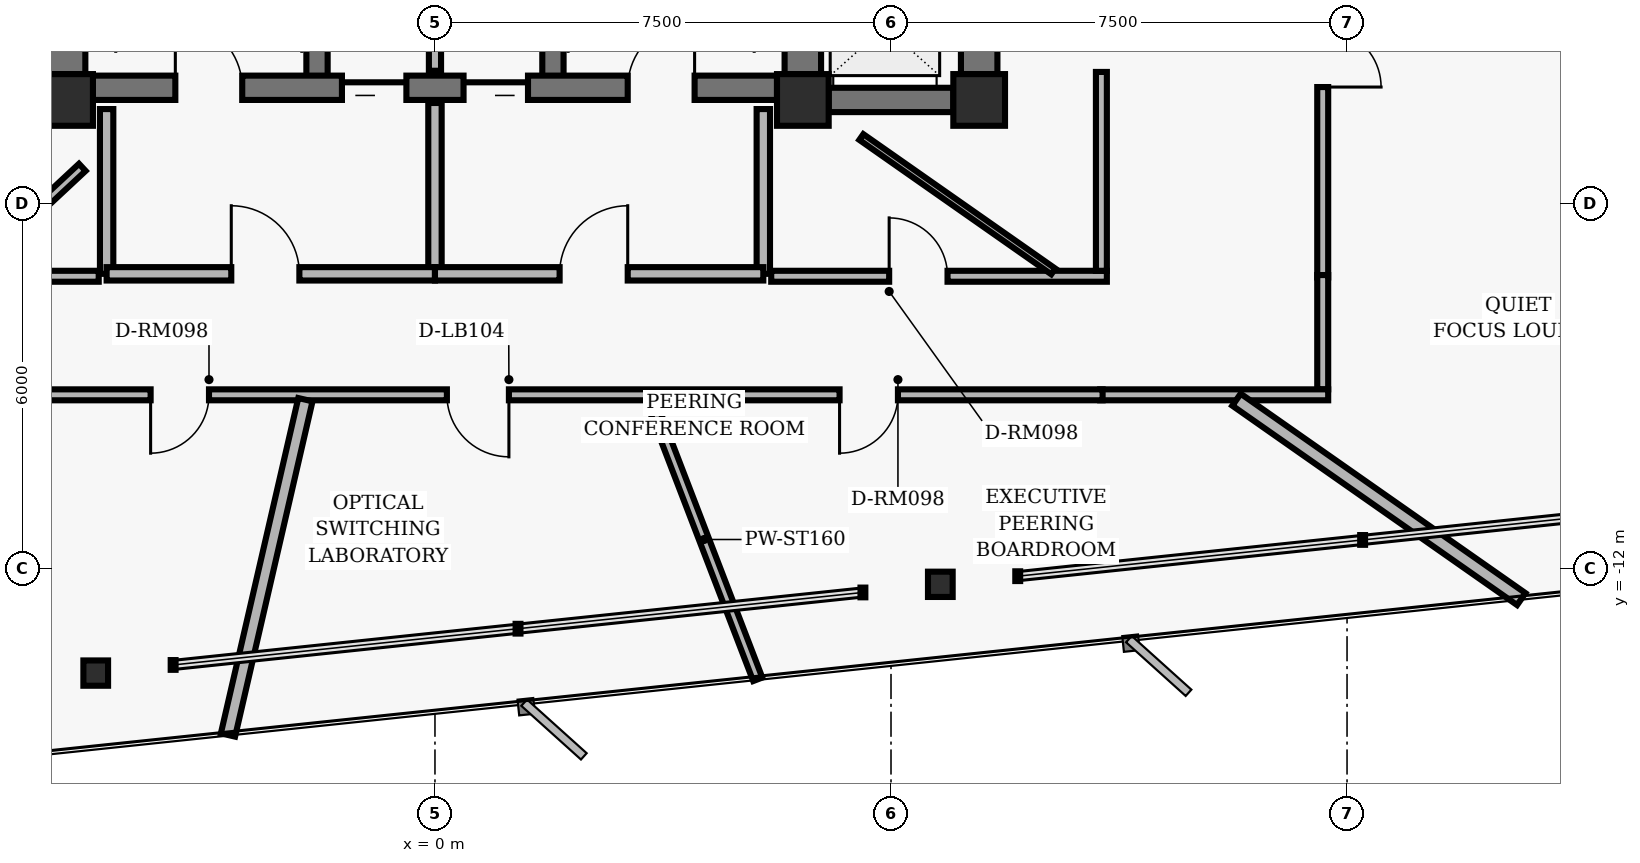
"""IFC4 building model, lengths in metres.
Left out: names, types, materials, properties, quantities, classifications, styles, units other than length and angle.
Written with IfcOpenShell. Run it as: python <this file> out.ifc"""

import sys

from ifc_helpers import new_model, si_unit, direction, frame, frame_2d, origin, origin_2d, place, context, subcontext, project, spatial, rectangle, hollow_rectangle, i_section, extrude, element, fill, save


model = new_model("IFC4")
c1 = context("Model", 3, precision=1e-05, world=origin(), true_north=direction((0.0, 1.0)))
c2 = subcontext(c1, "Body", "Model", "MODEL_VIEW")
j1 = project(units=[si_unit("LENGTHUNIT", "METRE"), si_unit("PLANEANGLEUNIT", "RADIAN")], contexts=[c1])
p1 = place(None, origin())
s1 = spatial("IfcSite", under=j1, at=p1, CompositionType="ELEMENT")
p2 = place(p1, origin())
s2 = spatial("IfcBuilding", under=s1, at=p2, CompositionType="ELEMENT")
p3 = place(p2, frame((0.0, 0.0, 116.8)))
s3 = spatial("IfcBuildingStorey", under=s2, at=p3, CompositionType="ELEMENT", Elevation=116.8)
for number, where, z_axis, x_axis in (
    (1, (-6.05, -4.3, 0.0), (0.0, 0.0, 1.0), (1.0, 0.0, 0.0)),
    (2, (6.05, -4.3, 0.0), (0.0, 0.0, 1.0), (1.0, 0.0, 0.0)),
    (3, (8.95, -4.3, 0.0), (0.0, 0.0, 1.0), (1.0, 0.0, 0.0)),
):
    element("IfcColumn", number, at=place(p3, frame(where, z_axis=z_axis, x_axis=x_axis)), inside=s3, PredefinedType="COLUMN", context=c2, shape_type="SweptSolid", body=[
        extrude(hollow_rectangle(XDim=0.85, YDim=0.85, WallThickness=0.055, InnerFilletRadius=0.02, OuterFilletRadius=0.04, at=origin_2d()), origin(), (0.0, 0.0, 1.0), 3.04),
    ])
for number, where, z_axis, x_axis in (
    (4, (-6.05, -3.875, 0.0), (0.0, 0.0, 1.0), (0.0, 1.0, 0.0)),
    (5, (6.05, -3.875, 0.0), (0.0, 0.0, 1.0), (0.0, 1.0, 0.0)),
):
    element("IfcWall", number, at=place(p3, frame(where, z_axis=z_axis, x_axis=x_axis)), inside=s3, PredefinedType="SHEAR", context=c2, shape_type="SweptSolid", body=[
        extrude(rectangle(XDim=3.45, YDim=0.6, at=frame_2d((1.725, 0.0))), origin(), (0.0, 0.0, 1.0), 2.788),
    ])
for number, where, z_axis, x_axis in (
    (6, (-1.94, -4.1, 0.0), (0.0, 0.0, 1.0), (0.0, 1.0, 0.0)),
    (7, (1.94, -4.1, 0.0), (0.0, 0.0, 1.0), (0.0, 1.0, 0.0)),
):
    element("IfcWall", number, at=place(p3, frame(where, z_axis=z_axis, x_axis=x_axis)), inside=s3, PredefinedType="SHEAR", context=c2, shape_type="SweptSolid", body=[
        extrude(rectangle(XDim=8.2, YDim=0.35, at=frame_2d((4.1, 0.0))), origin(), (0.0, 0.0, 1.0), 2.788),
    ])
p4 = place(p3, frame((-5.625, -4.1, 0.0), z_axis=(0.0, 0.0, 1.0), x_axis=(1.0, 0.0, 0.0)))
e8 = element("IfcWall", 8, at=p4, inside=s3, PredefinedType="SHEAR", context=c2, shape_type="SweptSolid", body=[
    extrude(rectangle(XDim=11.25, YDim=0.4, at=frame_2d((5.625, 0.0))), origin(), (0.0, 0.0, 1.0), 2.788),
])
p5 = place(p4, frame((1.355, 0.0, 0.0)))
e9 = element("IfcOpeningElement", 9, at=p5, cuts=e8, PredefinedType="OPENING", context=c2, shape_type="SweptSolid", body=[
    extrude(rectangle(XDim=1.1, YDim=2.04, at=frame_2d((0.55, 1.02))), frame((0.0, 0.21, 0.0), z_axis=(0.0, -1.0, 0.0), x_axis=(1.0, 0.0, 0.0)), (0.0, 0.0, 1.0), 0.42),
])
p6 = place(p4, frame((8.795, 0.0, 0.0)))
e10 = element("IfcOpeningElement", 10, at=p6, cuts=e8, PredefinedType="OPENING", context=c2, shape_type="SweptSolid", body=[
    extrude(rectangle(XDim=1.1, YDim=2.04, at=frame_2d((0.55, 1.02))), frame((0.0, 0.21, 0.0), z_axis=(0.0, -1.0, 0.0), x_axis=(1.0, 0.0, 0.0)), (0.0, 0.0, 1.0), 0.42),
])
p7 = place(p4, frame((4.095, 0.0, 0.0)))
e11 = element("IfcOpeningElement", 11, at=p7, cuts=e8, PredefinedType="OPENING", context=c2, shape_type="SweptSolid", body=[
    extrude(rectangle(XDim=1.06, YDim=2.04, at=frame_2d((0.53, 1.02))), frame((0.0, 0.21, 0.0), z_axis=(0.0, -1.0, 0.0), x_axis=(1.0, 0.0, 0.0)), (0.0, 0.0, 1.0), 0.42),
])
p8 = place(p4, frame((6.095, 0.0, 0.0)))
e12 = element("IfcOpeningElement", 12, at=p8, cuts=e8, PredefinedType="OPENING", context=c2, shape_type="SweptSolid", body=[
    extrude(rectangle(XDim=1.06, YDim=2.04, at=frame_2d((0.53, 1.02))), frame((0.0, 0.21, 0.0), z_axis=(0.0, -1.0, 0.0), x_axis=(1.0, 0.0, 0.0)), (0.0, 0.0, 1.0), 0.42),
])
p9 = place(p3, frame((8.95, -3.875, 0.0), z_axis=(0.0, 0.0, 1.0), x_axis=(0.0, 1.0, 0.0)))
e13 = element("IfcWall", 13, at=p9, inside=s3, PredefinedType="SHEAR", context=c2, shape_type="SweptSolid", body=[
    extrude(rectangle(XDim=7.95, YDim=0.6, at=frame_2d((3.975, 0.0))), origin(), (0.0, 0.0, 1.0), 2.788),
])
p10 = place(p9, frame((0.55, 0.0, 0.0)))
e14 = element("IfcOpeningElement", 14, at=p10, cuts=e13, PredefinedType="OPENING", context=c2, shape_type="SweptSolid", body=[
    extrude(rectangle(XDim=1.06, YDim=2.04, at=frame_2d((0.53, 1.02))), frame((0.0, 0.31, 0.0), z_axis=(0.0, -1.0, 0.0), x_axis=(1.0, 0.0, 0.0)), (0.0, 0.0, 1.0), 0.62),
])
p11 = place(p9, frame((3.445, 0.0, 0.0)))
e15 = element("IfcOpeningElement", 15, at=p11, cuts=e13, PredefinedType="OPENING", context=c2, shape_type="SweptSolid", body=[
    extrude(rectangle(XDim=1.06, YDim=2.04, at=frame_2d((0.53, 1.02))), frame((0.0, 0.31, 0.0), z_axis=(0.0, -1.0, 0.0), x_axis=(1.0, 0.0, 0.0)), (0.0, 0.0, 1.0), 0.62),
])
p12 = place(p9, frame((6.33, 0.0, 0.0)))
e16 = element("IfcOpeningElement", 16, at=p12, cuts=e13, PredefinedType="OPENING", context=c2, shape_type="SweptSolid", body=[
    extrude(rectangle(XDim=1.06, YDim=2.04, at=frame_2d((0.53, 1.02))), frame((0.0, 0.31, 0.0), z_axis=(0.0, -1.0, 0.0), x_axis=(1.0, 0.0, 0.0)), (0.0, 0.0, 1.0), 0.62),
])
p13 = place(p3, frame((6.475, -4.3, 0.0), z_axis=(0.0, 0.0, 1.0), x_axis=(1.0, 0.0, 0.0)))
e17 = element("IfcWall", 17, at=p13, inside=s3, PredefinedType="SHEAR", context=c2, shape_type="SweptSolid", body=[
    extrude(rectangle(XDim=2.05, YDim=0.4, at=frame_2d((1.025, 0.0))), origin(), (0.0, 0.0, 1.0), 2.788),
])
for number, where, z_axis, x_axis in (
    (18, (-5.579, -13.727, 0.0), (0.0, 0.0, 1.0), (1.0, 0.0, 0.0)),
    (19, (8.311, -12.267, 0.0), (0.0, 0.0, 1.0), (1.0, 0.0, 0.0)),
):
    element("IfcColumn", number, at=place(p3, frame(where, z_axis=z_axis, x_axis=x_axis)), inside=s3, PredefinedType="COLUMN", context=c2, shape_type="SweptSolid", body=[
        extrude(i_section(OverallWidth=0.406, OverallDepth=0.416, WebThickness=0.03, FlangeThickness=0.048, FilletRadius=0.02, at=origin_2d()), origin(), (0.0, 0.0, 1.0), 3.04),
    ])
p14 = place(p3, frame((0.0, -3.82, 0.0), z_axis=(0.0, 0.0, 1.0), x_axis=(0.0, 1.0, 0.0)))
e20 = element("IfcWall", 20, at=p14, inside=s3, PredefinedType="PARTITIONING", context=c2, shape_type="SweptSolid", body=[
    extrude(rectangle(XDim=2.67, YDim=0.2, at=frame_2d((1.335, 0.0))), origin(), (0.0, 0.0, 1.0), 2.763),
])
for number, where, z_axis, x_axis in (
    (21, (-5.4, -7.16, 0.0), (0.0, 0.0, 1.0), (0.0, 1.0, 0.0)),
    (22, (5.4, -7.16, 0.0), (0.0, 0.0, 1.0), (0.0, 1.0, 0.0)),
):
    element("IfcWall", number, at=place(p3, frame(where, z_axis=z_axis, x_axis=x_axis)), inside=s3, PredefinedType="PARTITIONING", context=c2, shape_type="SweptSolid", body=[
        extrude(rectangle(XDim=2.71, YDim=0.22, at=frame_2d((1.355, 0.0))), origin(), (0.0, 0.0, 1.0), 2.763),
    ])
p15 = place(p3, frame((0.0, -7.16, 0.0), z_axis=(0.0, 0.0, 1.0), x_axis=(0.0, 1.0, 0.0)))
e23 = element("IfcWall", 23, at=p15, inside=s3, PredefinedType="PARTITIONING", context=c2, shape_type="SweptSolid", body=[
    extrude(rectangle(XDim=2.81, YDim=0.22, at=frame_2d((1.405, 0.0))), origin(), (0.0, 0.0, 1.0), 2.763),
])
p16 = place(p3, frame((-5.4, -7.16, 0.0), z_axis=(0.0, 0.0, 1.0), x_axis=(1.0, 0.0, 0.0)))
e24 = element("IfcWall", 24, at=p16, inside=s3, PredefinedType="PARTITIONING", context=c2, shape_type="SweptSolid", body=[
    extrude(rectangle(XDim=5.4, YDim=0.22, at=frame_2d((2.7, 0.0))), origin(), (0.0, 0.0, 1.0), 2.33),
])
p17 = place(p16, frame((2.05, 0.0, 0.0)))
e25 = element("IfcOpeningElement", 25, at=p17, cuts=e24, PredefinedType="OPENING", context=c2, shape_type="SweptSolid", body=[
    extrude(rectangle(XDim=1.12, YDim=2.02, at=frame_2d((0.56, 1.01))), frame((0.0, 0.12, 0.0), z_axis=(0.0, -1.0, 0.0), x_axis=(1.0, 0.0, 0.0)), (0.0, 0.0, 1.0), 0.24),
])
p18 = place(p3, frame((0.0, -7.16, 0.0), z_axis=(0.0, 0.0, 1.0), x_axis=(1.0, 0.0, 0.0)))
e26 = element("IfcWall", 26, at=p18, inside=s3, PredefinedType="PARTITIONING", context=c2, shape_type="SweptSolid", body=[
    extrude(rectangle(XDim=5.4, YDim=0.22, at=frame_2d((2.7, 0.0))), origin(), (0.0, 0.0, 1.0), 2.33),
])
p19 = place(p18, frame((2.05, 0.0, 0.0)))
e27 = element("IfcOpeningElement", 27, at=p19, cuts=e26, PredefinedType="OPENING", context=c2, shape_type="SweptSolid", body=[
    extrude(rectangle(XDim=1.12, YDim=2.02, at=frame_2d((0.56, 1.01))), frame((0.0, 0.12, 0.0), z_axis=(0.0, -1.0, 0.0), x_axis=(1.0, 0.0, 0.0)), (0.0, 0.0, 1.0), 0.24),
])
p20 = place(p3, frame((14.6, 3.018, 0.0), z_axis=(0.0, 0.0, 1.0), x_axis=(0.0, -1.0, 0.0)))
e28 = element("IfcWall", 28, at=p20, inside=s3, PredefinedType="PARTITIONING", context=c2, shape_type="SweptSolid", body=[
    extrude(rectangle(XDim=10.238, YDim=0.18, at=frame_2d((5.119, 0.0))), origin(), (0.0, 0.0, 1.0), 2.763),
])
p21 = place(p20, frame((6.146, 0.0, 0.0)))
e29 = element("IfcOpeningElement", 29, at=p21, cuts=e28, PredefinedType="OPENING", context=c2, shape_type="SweptSolid", body=[
    extrude(rectangle(XDim=0.96, YDim=2.02, at=frame_2d((0.48, 1.01))), frame((0.0, 0.1, 0.0), z_axis=(0.0, -1.0, 0.0), x_axis=(1.0, 0.0, 0.0)), (0.0, 0.0, 1.0), 0.2),
])
p22 = place(p3, frame((14.6, -7.18, 0.0), z_axis=(0.0, 0.0, 1.0), x_axis=(0.0, -1.0, 0.0)))
e30 = element("IfcWall", 30, at=p22, inside=s3, PredefinedType="PARTITIONING", context=c2, shape_type="SweptSolid", body=[
    extrude(rectangle(XDim=1.88, YDim=0.18, at=frame_2d((0.94, 0.0))), origin(), (0.0, 0.0, 1.0), 2.763),
])
p23 = place(p3, frame((14.69, -9.15, 0.0), z_axis=(0.0, 0.0, 1.0), x_axis=(-1.0, 0.0, 0.0)))
e31 = element("IfcWall", 31, at=p23, inside=s3, PredefinedType="PARTITIONING", context=c2, shape_type="SweptSolid", body=[
    extrude(rectangle(XDim=3.75, YDim=0.18, at=frame_2d((1.875, 0.0))), origin(), (0.0, 0.0, 1.0), 2.33),
])
p24 = place(p3, frame((10.98, -9.15, 0.0), z_axis=(0.0, 0.0, 1.0), x_axis=(-1.0, 0.0, 0.0)))
e32 = element("IfcWall", 32, at=p24, inside=s3, PredefinedType="PARTITIONING", context=c2, shape_type="SweptSolid", body=[
    extrude(rectangle(XDim=17.5, YDim=0.18, at=frame_2d((8.75, 0.0))), origin(), (0.0, 0.0, 1.0), 2.33),
])
p25 = place(p24, frame((14.696, 0.0, 0.0)))
e33 = element("IfcOpeningElement", 33, at=p25, cuts=e32, PredefinedType="OPENING", context=c2, shape_type="SweptSolid", body=[
    extrude(rectangle(XDim=0.96, YDim=2.02, at=frame_2d((0.48, 1.01))), frame((0.0, 0.1, 0.0), z_axis=(0.0, -1.0, 0.0), x_axis=(1.0, 0.0, 0.0)), (0.0, 0.0, 1.0), 0.2),
])
p26 = place(p24, frame((9.764, 0.0, 0.0)))
e34 = element("IfcOpeningElement", 34, at=p26, cuts=e32, PredefinedType="OPENING", context=c2, shape_type="SweptSolid", body=[
    extrude(rectangle(XDim=1.02, YDim=2.02, at=frame_2d((0.51, 1.01))), frame((0.0, 0.1, 0.0), z_axis=(0.0, -1.0, 0.0), x_axis=(1.0, 0.0, 0.0)), (0.0, 0.0, 1.0), 0.2),
])
p27 = place(p24, frame((3.366, 0.0, 0.0)))
e35 = element("IfcOpeningElement", 35, at=p27, cuts=e32, PredefinedType="OPENING", context=c2, shape_type="SweptSolid", body=[
    extrude(rectangle(XDim=0.96, YDim=2.02, at=frame_2d((0.48, 1.01))), frame((0.0, 0.1, 0.0), z_axis=(0.0, -1.0, 0.0), x_axis=(1.0, 0.0, 0.0)), (0.0, 0.0, 1.0), 0.2),
])
p28 = place(p3, frame((5.53, -7.2, 0.0), z_axis=(0.0, 0.0, 1.0), x_axis=(1.0, 0.0, 0.0)))
e36 = element("IfcWall", 36, at=p28, inside=s3, PredefinedType="PARTITIONING", context=c2, shape_type="SweptSolid", body=[
    extrude(rectangle(XDim=5.52, YDim=0.18, at=frame_2d((2.76, 0.0))), origin(), (0.0, 0.0, 1.0), 2.33),
])
p29 = place(p28, frame((1.94, 0.0, 0.0)))
e37 = element("IfcOpeningElement", 37, at=p29, cuts=e36, PredefinedType="OPENING", context=c2, shape_type="SweptSolid", body=[
    extrude(rectangle(XDim=0.96, YDim=2.02, at=frame_2d((0.48, 1.01))), frame((0.0, 0.1, 0.0), z_axis=(0.0, -1.0, 0.0), x_axis=(1.0, 0.0, 0.0)), (0.0, 0.0, 1.0), 0.2),
])
p30 = place(p3, frame((10.96, -7.11, 0.0), z_axis=(0.0, 0.0, 1.0), x_axis=(0.0, 1.0, 0.0)))
e38 = element("IfcWall", 38, at=p30, inside=s3, PredefinedType="PARTITIONING", context=c2, shape_type="SweptSolid", body=[
    extrude(rectangle(XDim=3.271, YDim=0.18, at=frame_2d((1.635, 0.0))), origin(), (0.0, 0.0, 1.0), 2.763),
])
p31 = place(p3, frame((-6.59, -7.2, 0.0), z_axis=(0.0, 0.0, 1.0), x_axis=(1.0, 0.0, 0.0)))
e39 = element("IfcWall", 39, at=p31, inside=s3, PredefinedType="PARTITIONING", context=c2, shape_type="SweptSolid", body=[
    extrude(rectangle(XDim=1.06, YDim=0.18, at=frame_2d((0.53, 0.0))), origin(), (0.0, 0.0, 1.0), 2.33),
])
p32 = place(p3, frame((-5.8, -5.409, 0.0), z_axis=(0.0, 0.0, 1.0), x_axis=(-0.731304251281, -0.682051385204, 0.0)))
e40 = element("IfcWall", 40, at=p32, inside=s3, PredefinedType="PARTITIONING", context=c2, shape_type="SweptSolid", body=[
    extrude(rectangle(XDim=0.848, YDim=0.16, at=frame_2d((0.424, 0.0))), origin(), (0.0, 0.0, 1.0), 2.763),
])
p33 = place(p3, frame((-2.131, -9.23, 0.0), z_axis=(0.0, 0.0, 1.0), x_axis=(-0.224947713915, -0.974370835978, 0.0)))
e41 = element("IfcWall", 41, at=p33, inside=s3, PredefinedType="PARTITIONING", context=c2, shape_type="SweptSolid", body=[
    extrude(rectangle(XDim=5.66, YDim=0.24, at=frame_2d((2.83, 0.0))), origin(), (0.0, 0.0, 1.0), 2.763),
])
p34 = place(p3, frame((3.543, -9.23, 0.0), z_axis=(0.0, 0.0, 1.0), x_axis=(0.358357985043, -0.93358425145, 0.0)))
e42 = element("IfcWall", 42, at=p34, inside=s3, PredefinedType="PARTITIONING", context=c2, shape_type="SweptSolid", body=[
    extrude(rectangle(XDim=4.926, YDim=0.16, at=frame_2d((2.463, 0.0))), origin(), (0.0, 0.0, 1.0), 2.763),
])
p35 = place(p3, frame((7.012, -4.91, 0.0), z_axis=(0.0, 0.0, 1.0), x_axis=(0.819130700295, -0.573606917526, 0.0)))
e43 = element("IfcWall", 43, at=p35, inside=s3, PredefinedType="MOVABLE", context=c2, shape_type="SweptSolid", body=[
    extrude(rectangle(XDim=3.853, YDim=0.115, at=frame_2d((1.927, 0.0))), origin(), (0.0, 0.0, 1.0), 2.763),
])
p36 = place(p3, frame((13.182, -9.23, 0.0), z_axis=(0.0, 0.0, 1.0), x_axis=(0.819133610169, -0.573602762102, 0.0)))
e44 = element("IfcWall", 44, at=p36, inside=s3, PredefinedType="PARTITIONING", context=c2, shape_type="SweptSolid", body=[
    extrude(rectangle(XDim=5.718, YDim=0.24, at=frame_2d((2.859, 0.0))), origin(), (0.0, 0.0, 1.0), 2.763),
])
p37 = place(p5, origin())
e45 = element("IfcDoor", 45, at=p37, inside=s3, OperationType="SINGLE_SWING_LEFT", PredefinedType="DOOR", context=c2, shape_type="SweptSolid", body=[
    extrude(rectangle(XDim=1.1, YDim=2.04, at=frame_2d((0.55, 1.02))), frame((0.0, 0.025, 0.0), z_axis=(0.0, -1.0, 0.0), x_axis=(1.0, 0.0, 0.0)), (0.0, 0.0, 1.0), 0.05),
])
fill(e9, e45)
p38 = place(p6, origin())
e46 = element("IfcDoor", 46, at=p38, inside=s3, OperationType="SINGLE_SWING_RIGHT", PredefinedType="DOOR", context=c2, shape_type="SweptSolid", body=[
    extrude(rectangle(XDim=1.1, YDim=2.04, at=frame_2d((0.55, 1.02))), frame((0.0, 0.025, 0.0), z_axis=(0.0, -1.0, 0.0), x_axis=(1.0, 0.0, 0.0)), (0.0, 0.0, 1.0), 0.05),
])
fill(e10, e46)
p39 = place(p7, origin())
e47 = element("IfcDoor", 47, at=p39, inside=s3, OperationType="SLIDING_TO_LEFT", PredefinedType="DOOR", context=c2, shape_type="SweptSolid", body=[
    extrude(rectangle(XDim=1.06, YDim=2.04, at=frame_2d((0.53, 1.02))), frame((0.0, 0.025, 0.0), z_axis=(0.0, -1.0, 0.0), x_axis=(1.0, 0.0, 0.0)), (0.0, 0.0, 1.0), 0.05),
])
fill(e11, e47)
p40 = place(p8, origin())
e48 = element("IfcDoor", 48, at=p40, inside=s3, OperationType="SLIDING_TO_RIGHT", PredefinedType="DOOR", context=c2, shape_type="SweptSolid", body=[
    extrude(rectangle(XDim=1.06, YDim=2.04, at=frame_2d((0.53, 1.02))), frame((0.0, 0.025, 0.0), z_axis=(0.0, -1.0, 0.0), x_axis=(1.0, 0.0, 0.0)), (0.0, 0.0, 1.0), 0.05),
])
fill(e12, e48)
p41 = place(p17, origin())
e49 = element("IfcDoor", 49, at=p41, inside=s3, OperationType="SINGLE_SWING_LEFT", PredefinedType="DOOR", context=c2, shape_type="SweptSolid", body=[
    extrude(rectangle(XDim=1.12, YDim=2.02, at=frame_2d((0.56, 1.01))), frame((0.0, 0.025, 0.0), z_axis=(0.0, -1.0, 0.0), x_axis=(1.0, 0.0, 0.0)), (0.0, 0.0, 1.0), 0.05),
])
fill(e25, e49)
p42 = place(p19, origin())
e50 = element("IfcDoor", 50, at=p42, inside=s3, OperationType="SINGLE_SWING_RIGHT", PredefinedType="DOOR", context=c2, shape_type="SweptSolid", body=[
    extrude(rectangle(XDim=1.12, YDim=2.02, at=frame_2d((0.56, 1.01))), frame((0.0, 0.025, 0.0), z_axis=(0.0, -1.0, 0.0), x_axis=(1.0, 0.0, 0.0)), (0.0, 0.0, 1.0), 0.05),
])
fill(e27, e50)
p43 = place(p25, origin())
e51 = element("IfcDoor", 51, at=p43, inside=s3, OperationType="SINGLE_SWING_RIGHT", PredefinedType="DOOR", context=c2, shape_type="SweptSolid", body=[
    extrude(rectangle(XDim=0.96, YDim=2.02, at=frame_2d((0.48, 1.01))), frame((0.0, 0.025, 0.0), z_axis=(0.0, -1.0, 0.0), x_axis=(1.0, 0.0, 0.0)), (0.0, 0.0, 1.0), 0.05),
])
fill(e33, e51)
p44 = place(p26, origin())
e52 = element("IfcDoor", 52, at=p44, inside=s3, OperationType="SINGLE_SWING_LEFT", PredefinedType="DOOR", context=c2, shape_type="SweptSolid", body=[
    extrude(rectangle(XDim=1.02, YDim=2.02, at=frame_2d((0.51, 1.01))), frame((0.0, 0.025, 0.0), z_axis=(0.0, -1.0, 0.0), x_axis=(1.0, 0.0, 0.0)), (0.0, 0.0, 1.0), 0.05),
])
fill(e34, e52)
p45 = place(p27, origin())
e53 = element("IfcDoor", 53, at=p45, inside=s3, OperationType="SINGLE_SWING_RIGHT", PredefinedType="DOOR", context=c2, shape_type="SweptSolid", body=[
    extrude(rectangle(XDim=0.96, YDim=2.02, at=frame_2d((0.48, 1.01))), frame((0.0, 0.025, 0.0), z_axis=(0.0, -1.0, 0.0), x_axis=(1.0, 0.0, 0.0)), (0.0, 0.0, 1.0), 0.05),
])
fill(e35, e53)
p46 = place(p29, origin())
e54 = element("IfcDoor", 54, at=p46, inside=s3, OperationType="SINGLE_SWING_LEFT", PredefinedType="DOOR", context=c2, shape_type="SweptSolid", body=[
    extrude(rectangle(XDim=0.96, YDim=2.02, at=frame_2d((0.48, 1.01))), frame((0.0, 0.025, 0.0), z_axis=(0.0, -1.0, 0.0), x_axis=(1.0, 0.0, 0.0)), (0.0, 0.0, 1.0), 0.05),
])
fill(e37, e54)
p47 = place(p21, origin())
e55 = element("IfcDoor", 55, at=p47, inside=s3, OperationType="SINGLE_SWING_RIGHT", PredefinedType="DOOR", context=c2, shape_type="SweptSolid", body=[
    extrude(rectangle(XDim=0.96, YDim=2.02, at=frame_2d((0.48, 1.01))), frame((0.0, 0.025, 0.0), z_axis=(0.0, -1.0, 0.0), x_axis=(1.0, 0.0, 0.0)), (0.0, 0.0, 1.0), 0.05),
])
fill(e29, e55)
save(model, sys.argv[1])
